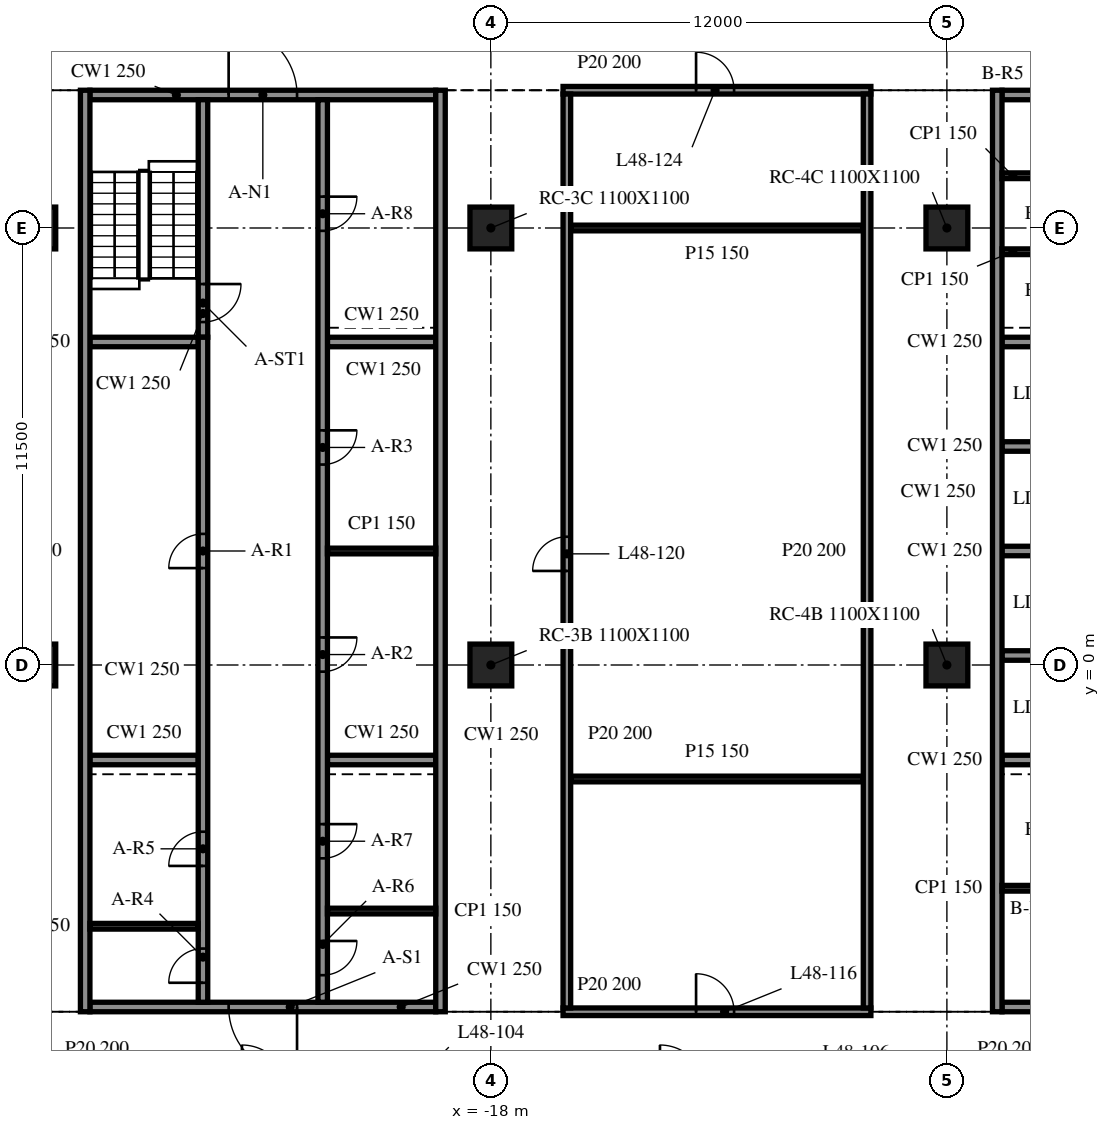
"""IFC4 building model, lengths in metres.
Left out: names, types, materials, properties, quantities, classifications, styles, units other than length and angle.
Written with IfcOpenShell. Run it as: python <this file> out.ifc"""

import sys

from ifc_helpers import new_model, si_unit, direction, frame, frame_2d, origin, origin_2d, place, context, subcontext, project, spatial, rectangle, extrude, element, fill, save


model = new_model("IFC4")
c1 = context("Model", 3, precision=1e-05, world=origin(), true_north=direction((0.0, 1.0)))
c2 = subcontext(c1, "Body", "Model", "MODEL_VIEW")
j1 = project(units=[si_unit("LENGTHUNIT", "METRE"), si_unit("PLANEANGLEUNIT", "RADIAN")], contexts=[c1])
p1 = place(None, origin())
s1 = spatial("IfcSite", under=j1, at=p1, CompositionType="ELEMENT")
p2 = place(p1, origin())
s2 = spatial("IfcBuilding", under=s1, at=p2, CompositionType="ELEMENT")
p3 = place(p2, frame((0.0, 0.0, 201.5)))
s3 = spatial("IfcBuildingStorey", under=s2, at=p3, CompositionType="ELEMENT", Elevation=201.5)
for number, where, z_axis, x_axis in (
    (1, (-30.0, 0.0, -0.34), (0.0, 0.0, 1.0), (1.0, 0.0, 0.0)),
    (2, (-30.0, 11.5, -0.34), (0.0, 0.0, 1.0), (1.0, 0.0, 0.0)),
    (3, (-18.0, 0.0, -0.34), (0.0, 0.0, 1.0), (1.0, 0.0, 0.0)),
    (4, (-18.0, 11.5, -0.34), (0.0, 0.0, 1.0), (1.0, 0.0, 0.0)),
    (5, (-6.0, 0.0, -0.34), (0.0, 0.0, 1.0), (1.0, 0.0, 0.0)),
    (6, (-6.0, 11.5, -0.34), (0.0, 0.0, 1.0), (1.0, 0.0, 0.0)),
):
    element("IfcColumn", number, at=place(p3, frame(where, z_axis=z_axis, x_axis=x_axis)), inside=s3, PredefinedType="COLUMN", context=c2, shape_type="SweptSolid", body=[
        extrude(rectangle(XDim=1.1, YDim=1.1, at=origin_2d()), origin(), (0.0, 0.0, 1.0), 3.8),
    ])
for number, where, z_axis, x_axis in (
    (7, (-28.675, 15.125, 0.0), (0.0, 0.0, 1.0), (0.0, -1.0, 0.0)),
    (8, (-19.325, -9.125, 0.0), (0.0, 0.0, 1.0), (0.0, 1.0, 0.0)),
):
    element("IfcWall", number, at=place(p3, frame(where, z_axis=z_axis, x_axis=x_axis)), inside=s3, PredefinedType="SOLIDWALL", context=c2, shape_type="SweptSolid", body=[
        extrude(rectangle(XDim=24.25, YDim=0.25, at=frame_2d((12.125, 0.0))), origin(), (0.0, 0.0, 1.0), 3.46),
    ])
p4 = place(p3, frame((-19.45, -9.0, 0.0), z_axis=(0.0, 0.0, 1.0), x_axis=(-1.0, 0.0, 0.0)))
e9 = element("IfcWall", 9, at=p4, inside=s3, PredefinedType="SOLIDWALL", context=c2, shape_type="SweptSolid", body=[
    extrude(rectangle(XDim=9.1, YDim=0.25, at=frame_2d((4.55, 0.0))), origin(), (0.0, 0.0, 1.0), 3.46),
])
p5 = place(p4, frame((3.65, 0.0, 0.0)))
e10 = element("IfcOpeningElement", 10, at=p5, cuts=e9, PredefinedType="OPENING", context=c2, shape_type="SweptSolid", body=[
    extrude(rectangle(XDim=1.8, YDim=2.1, at=frame_2d((0.9, 1.05))), frame((0.0, 0.135, 0.0), z_axis=(0.0, -1.0, 0.0), x_axis=(1.0, 0.0, 0.0)), (0.0, 0.0, 1.0), 0.27),
])
p6 = place(p3, frame((-28.55, 15.0, 0.0), z_axis=(0.0, 0.0, 1.0), x_axis=(1.0, 0.0, 0.0)))
e11 = element("IfcWall", 11, at=p6, inside=s3, PredefinedType="SOLIDWALL", context=c2, shape_type="SweptSolid", body=[
    extrude(rectangle(XDim=9.1, YDim=0.25, at=frame_2d((4.55, 0.0))), origin(), (0.0, 0.0, 1.0), 3.46),
])
p7 = place(p6, frame((3.65, 0.0, 0.0)))
e12 = element("IfcOpeningElement", 12, at=p7, cuts=e11, PredefinedType="OPENING", context=c2, shape_type="SweptSolid", body=[
    extrude(rectangle(XDim=1.8, YDim=2.1, at=frame_2d((0.9, 1.05))), frame((0.0, 0.135, 0.0), z_axis=(0.0, -1.0, 0.0), x_axis=(1.0, 0.0, 0.0)), (0.0, 0.0, 1.0), 0.27),
])
p8 = place(p3, frame((-25.575, -8.875, 0.0), z_axis=(0.0, 0.0, 1.0), x_axis=(0.0, 1.0, 0.0)))
e13 = element("IfcWall", 13, at=p8, inside=s3, PredefinedType="SOLIDWALL", context=c2, shape_type="SweptSolid", body=[
    extrude(rectangle(XDim=17.5, YDim=0.25, at=frame_2d((8.75, 0.0))), origin(), (0.0, 0.0, 1.0), 3.46),
])
p9 = place(p8, frame((11.425, 0.0, 0.0)))
e14 = element("IfcOpeningElement", 14, at=p9, cuts=e13, PredefinedType="OPENING", context=c2, shape_type="SweptSolid", body=[
    extrude(rectangle(XDim=0.9, YDim=2.1, at=frame_2d((0.45, 1.05))), frame((0.0, 0.135, 0.0), z_axis=(0.0, -1.0, 0.0), x_axis=(1.0, 0.0, 0.0)), (0.0, 0.0, 1.0), 0.27),
])
p10 = place(p8, frame((0.512, 0.0, 0.0)))
e15 = element("IfcOpeningElement", 15, at=p10, cuts=e13, PredefinedType="OPENING", context=c2, shape_type="SweptSolid", body=[
    extrude(rectangle(XDim=0.9, YDim=2.1, at=frame_2d((0.45, 1.05))), frame((0.0, 0.135, 0.0), z_axis=(0.0, -1.0, 0.0), x_axis=(1.0, 0.0, 0.0)), (0.0, 0.0, 1.0), 0.27),
])
p11 = place(p8, frame((3.587, 0.0, 0.0)))
e16 = element("IfcOpeningElement", 16, at=p11, cuts=e13, PredefinedType="OPENING", context=c2, shape_type="SweptSolid", body=[
    extrude(rectangle(XDim=0.9, YDim=2.1, at=frame_2d((0.45, 1.05))), frame((0.0, 0.135, 0.0), z_axis=(0.0, -1.0, 0.0), x_axis=(1.0, 0.0, 0.0)), (0.0, 0.0, 1.0), 0.27),
])
p12 = place(p3, frame((-25.575, 14.875, 0.0), z_axis=(0.0, 0.0, 1.0), x_axis=(0.0, -1.0, 0.0)))
e17 = element("IfcWall", 17, at=p12, inside=s3, PredefinedType="SOLIDWALL", context=c2, shape_type="SweptSolid", body=[
    extrude(rectangle(XDim=6.25, YDim=0.25, at=frame_2d((3.125, 0.0))), origin(), (0.0, 0.0, 1.0), 3.46),
])
p13 = place(p12, frame((4.85, 0.0, 0.0)))
e18 = element("IfcOpeningElement", 18, at=p13, cuts=e17, PredefinedType="OPENING", context=c2, shape_type="SweptSolid", body=[
    extrude(rectangle(XDim=1.0, YDim=2.1, at=frame_2d((0.5, 1.05))), frame((0.0, 0.135, 0.0), z_axis=(0.0, -1.0, 0.0), x_axis=(1.0, 0.0, 0.0)), (0.0, 0.0, 1.0), 0.27),
])
p14 = place(p3, frame((-22.425, 14.875, 0.0), z_axis=(0.0, 0.0, 1.0), x_axis=(0.0, -1.0, 0.0)))
e19 = element("IfcWall", 19, at=p14, inside=s3, PredefinedType="SOLIDWALL", context=c2, shape_type="SweptSolid", body=[
    extrude(rectangle(XDim=23.75, YDim=0.25, at=frame_2d((11.875, 0.0))), origin(), (0.0, 0.0, 1.0), 3.46),
])
p15 = place(p14, frame((14.15, 0.0, 0.0)))
e20 = element("IfcOpeningElement", 20, at=p15, cuts=e19, PredefinedType="OPENING", context=c2, shape_type="SweptSolid", body=[
    extrude(rectangle(XDim=0.9, YDim=2.1, at=frame_2d((0.45, 1.05))), frame((0.0, 0.135, 0.0), z_axis=(0.0, -1.0, 0.0), x_axis=(1.0, 0.0, 0.0)), (0.0, 0.0, 1.0), 0.27),
])
p16 = place(p14, frame((8.7, 0.0, 0.0)))
e21 = element("IfcOpeningElement", 21, at=p16, cuts=e19, PredefinedType="OPENING", context=c2, shape_type="SweptSolid", body=[
    extrude(rectangle(XDim=0.9, YDim=2.1, at=frame_2d((0.45, 1.05))), frame((0.0, 0.135, 0.0), z_axis=(0.0, -1.0, 0.0), x_axis=(1.0, 0.0, 0.0)), (0.0, 0.0, 1.0), 0.27),
])
p17 = place(p14, frame((22.137, 0.0, 0.0)))
e22 = element("IfcOpeningElement", 22, at=p17, cuts=e19, PredefinedType="OPENING", context=c2, shape_type="SweptSolid", body=[
    extrude(rectangle(XDim=0.9, YDim=2.1, at=frame_2d((0.45, 1.05))), frame((0.0, 0.135, 0.0), z_axis=(0.0, -1.0, 0.0), x_axis=(1.0, 0.0, 0.0)), (0.0, 0.0, 1.0), 0.27),
])
p18 = place(p14, frame((19.062, 0.0, 0.0)))
e23 = element("IfcOpeningElement", 23, at=p18, cuts=e19, PredefinedType="OPENING", context=c2, shape_type="SweptSolid", body=[
    extrude(rectangle(XDim=0.9, YDim=2.1, at=frame_2d((0.45, 1.05))), frame((0.0, 0.135, 0.0), z_axis=(0.0, -1.0, 0.0), x_axis=(1.0, 0.0, 0.0)), (0.0, 0.0, 1.0), 0.27),
])
p19 = place(p14, frame((2.55, 0.0, 0.0)))
e24 = element("IfcOpeningElement", 24, at=p19, cuts=e19, PredefinedType="OPENING", context=c2, shape_type="SweptSolid", body=[
    extrude(rectangle(XDim=0.9, YDim=2.1, at=frame_2d((0.45, 1.05))), frame((0.0, 0.135, 0.0), z_axis=(0.0, -1.0, 0.0), x_axis=(1.0, 0.0, 0.0)), (0.0, 0.0, 1.0), 0.27),
])
for number, where, z_axis, x_axis in (
    (25, (-28.55, -2.5, 0.0), (0.0, 0.0, 1.0), (1.0, 0.0, 0.0)),
    (26, (-28.55, 8.5, 0.0), (0.0, 0.0, 1.0), (1.0, 0.0, 0.0)),
    (27, (-22.3, -2.5, 0.0), (0.0, 0.0, 1.0), (1.0, 0.0, 0.0)),
    (28, (-22.3, 8.5, 0.0), (0.0, 0.0, 1.0), (1.0, 0.0, 0.0)),
):
    element("IfcWall", number, at=place(p3, frame(where, z_axis=z_axis, x_axis=x_axis)), inside=s3, PredefinedType="SOLIDWALL", context=c2, shape_type="SweptSolid", body=[
        extrude(rectangle(XDim=2.85, YDim=0.25, at=frame_2d((1.425, 0.0))), origin(), (0.0, 0.0, 1.0), 3.46),
    ])
for number, where, z_axis, x_axis in (
    (29, (-22.3, 3.0, 0.0), (0.0, 0.0, 1.0), (1.0, 0.0, 0.0)),
    (30, (-28.55, -6.875, 0.0), (0.0, 0.0, 1.0), (1.0, 0.0, 0.0)),
    (31, (-22.3, -6.475, 0.0), (0.0, 0.0, 1.0), (1.0, 0.0, 0.0)),
):
    element("IfcWall", number, at=place(p3, frame(where, z_axis=z_axis, x_axis=x_axis)), inside=s3, PredefinedType="PARTITIONING", context=c2, shape_type="SweptSolid", body=[
        extrude(rectangle(XDim=2.85, YDim=0.15, at=frame_2d((1.425, 0.0))), origin(), (0.0, 0.0, 1.0), 3.46),
    ])
p20 = place(p3, frame((-4.675, 15.125, 0.0), z_axis=(0.0, 0.0, 1.0), x_axis=(0.0, -1.0, 0.0)))
e32 = element("IfcWall", 32, at=p20, inside=s3, PredefinedType="SOLIDWALL", context=c2, shape_type="SweptSolid", body=[
    extrude(rectangle(XDim=24.25, YDim=0.25, at=frame_2d((12.125, 0.0))), origin(), (0.0, 0.0, 1.0), 3.46),
])
p21 = place(p3, frame((4.55, -9.0, 0.0), z_axis=(0.0, 0.0, 1.0), x_axis=(-1.0, 0.0, 0.0)))
e33 = element("IfcWall", 33, at=p21, inside=s3, PredefinedType="SOLIDWALL", context=c2, shape_type="SweptSolid", body=[
    extrude(rectangle(XDim=9.1, YDim=0.25, at=frame_2d((4.55, 0.0))), origin(), (0.0, 0.0, 1.0), 3.46),
])
p22 = place(p21, frame((3.65, 0.0, 0.0)))
e34 = element("IfcOpeningElement", 34, at=p22, cuts=e33, PredefinedType="OPENING", context=c2, shape_type="SweptSolid", body=[
    extrude(rectangle(XDim=1.8, YDim=2.1, at=frame_2d((0.9, 1.05))), frame((0.0, 0.135, 0.0), z_axis=(0.0, -1.0, 0.0), x_axis=(1.0, 0.0, 0.0)), (0.0, 0.0, 1.0), 0.27),
])
p23 = place(p3, frame((-4.55, 15.0, 0.0), z_axis=(0.0, 0.0, 1.0), x_axis=(1.0, 0.0, 0.0)))
e35 = element("IfcWall", 35, at=p23, inside=s3, PredefinedType="SOLIDWALL", context=c2, shape_type="SweptSolid", body=[
    extrude(rectangle(XDim=9.1, YDim=0.25, at=frame_2d((4.55, 0.0))), origin(), (0.0, 0.0, 1.0), 3.46),
])
p24 = place(p23, frame((3.65, 0.0, 0.0)))
e36 = element("IfcOpeningElement", 36, at=p24, cuts=e35, PredefinedType="OPENING", context=c2, shape_type="SweptSolid", body=[
    extrude(rectangle(XDim=1.8, YDim=2.1, at=frame_2d((0.9, 1.05))), frame((0.0, 0.135, 0.0), z_axis=(0.0, -1.0, 0.0), x_axis=(1.0, 0.0, 0.0)), (0.0, 0.0, 1.0), 0.27),
])
for number, where, z_axis, x_axis in (
    (37, (-4.55, -2.5, 0.0), (0.0, 0.0, 1.0), (1.0, 0.0, 0.0)),
    (38, (-4.55, 0.25, 0.0), (0.0, 0.0, 1.0), (1.0, 0.0, 0.0)),
    (39, (-4.55, 3.0, 0.0), (0.0, 0.0, 1.0), (1.0, 0.0, 0.0)),
    (40, (-4.55, 5.75, 0.0), (0.0, 0.0, 1.0), (1.0, 0.0, 0.0)),
    (41, (-4.55, 8.5, 0.0), (0.0, 0.0, 1.0), (1.0, 0.0, 0.0)),
):
    element("IfcWall", number, at=place(p3, frame(where, z_axis=z_axis, x_axis=x_axis)), inside=s3, PredefinedType="SOLIDWALL", context=c2, shape_type="SweptSolid", body=[
        extrude(rectangle(XDim=2.85, YDim=0.25, at=frame_2d((1.425, 0.0))), origin(), (0.0, 0.0, 1.0), 3.46),
    ])
for number, where, z_axis, x_axis in (
    (42, (-4.55, -5.875, 0.0), (0.0, 0.0, 1.0), (1.0, 0.0, 0.0)),
    (43, (-4.55, 10.875, 0.0), (0.0, 0.0, 1.0), (1.0, 0.0, 0.0)),
    (44, (-4.55, 12.875, 0.0), (0.0, 0.0, 1.0), (1.0, 0.0, 0.0)),
):
    element("IfcWall", number, at=place(p3, frame(where, z_axis=z_axis, x_axis=x_axis)), inside=s3, PredefinedType="PARTITIONING", context=c2, shape_type="SweptSolid", body=[
        extrude(rectangle(XDim=2.85, YDim=0.15, at=frame_2d((1.425, 0.0))), origin(), (0.0, 0.0, 1.0), 3.46),
    ])
p25 = place(p3, frame((-16.1, -9.125, 0.0), z_axis=(0.0, 0.0, 1.0), x_axis=(1.0, 0.0, 0.0)))
e45 = element("IfcWall", 45, at=p25, inside=s3, PredefinedType="PARTITIONING", context=c2, shape_type="SweptSolid", body=[
    extrude(rectangle(XDim=8.1, YDim=0.2, at=frame_2d((4.05, 0.0))), origin(), (0.0, 0.0, 1.0), 3.46),
])
p26 = place(p25, frame((3.5, 0.0, 0.0)))
e46 = element("IfcOpeningElement", 46, at=p26, cuts=e45, PredefinedType="OPENING", context=c2, shape_type="SweptSolid", body=[
    extrude(rectangle(XDim=1.0, YDim=2.1, at=frame_2d((0.5, 1.05))), frame((0.0, 0.11, 0.0), z_axis=(0.0, -1.0, 0.0), x_axis=(1.0, 0.0, 0.0)), (0.0, 0.0, 1.0), 0.22),
])
for number, where, z_axis, x_axis in (
    (47, (-15.9, -3.0, 0.0), (0.0, 0.0, 1.0), (1.0, 0.0, 0.0)),
    (48, (-15.9, 11.5, 0.0), (0.0, 0.0, 1.0), (1.0, 0.0, 0.0)),
):
    element("IfcWall", number, at=place(p3, frame(where, z_axis=z_axis, x_axis=x_axis)), inside=s3, PredefinedType="PARTITIONING", context=c2, shape_type="SweptSolid", body=[
        extrude(rectangle(XDim=7.7, YDim=0.15, at=frame_2d((3.85, 0.0))), origin(), (0.0, 0.0, 1.0), 3.46),
    ])
p27 = place(p3, frame((-16.1, 15.125, 0.0), z_axis=(0.0, 0.0, 1.0), x_axis=(1.0, 0.0, 0.0)))
e49 = element("IfcWall", 49, at=p27, inside=s3, PredefinedType="PARTITIONING", context=c2, shape_type="SweptSolid", body=[
    extrude(rectangle(XDim=8.1, YDim=0.2, at=frame_2d((4.05, 0.0))), origin(), (0.0, 0.0, 1.0), 3.46),
])
p28 = place(p27, frame((3.5, 0.0, 0.0)))
e50 = element("IfcOpeningElement", 50, at=p28, cuts=e49, PredefinedType="OPENING", context=c2, shape_type="SweptSolid", body=[
    extrude(rectangle(XDim=1.0, YDim=2.1, at=frame_2d((0.5, 1.05))), frame((0.0, 0.11, 0.0), z_axis=(0.0, -1.0, 0.0), x_axis=(1.0, 0.0, 0.0)), (0.0, 0.0, 1.0), 0.22),
])
p29 = place(p3, frame((-16.0, -9.025, 0.0), z_axis=(0.0, 0.0, 1.0), x_axis=(0.0, 1.0, 0.0)))
e51 = element("IfcWall", 51, at=p29, inside=s3, PredefinedType="PARTITIONING", context=c2, shape_type="SweptSolid", body=[
    extrude(rectangle(XDim=24.05, YDim=0.2, at=frame_2d((12.025, 0.0))), origin(), (0.0, 0.0, 1.0), 3.46),
])
p30 = place(p29, frame((11.5, 0.0, 0.0)))
e52 = element("IfcOpeningElement", 52, at=p30, cuts=e51, PredefinedType="OPENING", context=c2, shape_type="SweptSolid", body=[
    extrude(rectangle(XDim=0.9, YDim=2.1, at=frame_2d((0.45, 1.05))), frame((0.0, 0.11, 0.0), z_axis=(0.0, -1.0, 0.0), x_axis=(1.0, 0.0, 0.0)), (0.0, 0.0, 1.0), 0.22),
])
p31 = place(p3, frame((-8.1, -9.025, 0.0), z_axis=(0.0, 0.0, 1.0), x_axis=(0.0, 1.0, 0.0)))
e53 = element("IfcWall", 53, at=p31, inside=s3, PredefinedType="PARTITIONING", context=c2, shape_type="SweptSolid", body=[
    extrude(rectangle(XDim=24.05, YDim=0.2, at=frame_2d((12.025, 0.0))), origin(), (0.0, 0.0, 1.0), 3.46),
])
p32 = place(p5, origin())
e54 = element("IfcDoor", 54, at=p32, inside=s3, OperationType="DOUBLE_DOOR_SINGLE_SWING", PredefinedType="DOOR", context=c2, shape_type="SweptSolid", body=[
    extrude(rectangle(XDim=1.8, YDim=2.1, at=frame_2d((0.9, 1.05))), frame((0.0, 0.025, 0.0), z_axis=(0.0, -1.0, 0.0), x_axis=(1.0, 0.0, 0.0)), (0.0, 0.0, 1.0), 0.05),
])
fill(e10, e54)
p33 = place(p7, origin())
e55 = element("IfcDoor", 55, at=p33, inside=s3, OperationType="DOUBLE_DOOR_SINGLE_SWING", PredefinedType="DOOR", context=c2, shape_type="SweptSolid", body=[
    extrude(rectangle(XDim=1.8, YDim=2.1, at=frame_2d((0.9, 1.05))), frame((0.0, 0.025, 0.0), z_axis=(0.0, -1.0, 0.0), x_axis=(1.0, 0.0, 0.0)), (0.0, 0.0, 1.0), 0.05),
])
fill(e12, e55)
p34 = place(p9, origin())
e56 = element("IfcDoor", 56, at=p34, inside=s3, OperationType="SINGLE_SWING_LEFT", PredefinedType="DOOR", context=c2, shape_type="SweptSolid", body=[
    extrude(rectangle(XDim=0.9, YDim=2.1, at=frame_2d((0.45, 1.05))), frame((0.0, 0.025, 0.0), z_axis=(0.0, -1.0, 0.0), x_axis=(1.0, 0.0, 0.0)), (0.0, 0.0, 1.0), 0.05),
])
fill(e14, e56)
p35 = place(p15, origin())
e57 = element("IfcDoor", 57, at=p35, inside=s3, OperationType="SINGLE_SWING_RIGHT", PredefinedType="DOOR", context=c2, shape_type="SweptSolid", body=[
    extrude(rectangle(XDim=0.9, YDim=2.1, at=frame_2d((0.45, 1.05))), frame((0.0, 0.025, 0.0), z_axis=(0.0, -1.0, 0.0), x_axis=(1.0, 0.0, 0.0)), (0.0, 0.0, 1.0), 0.05),
])
fill(e20, e57)
p36 = place(p16, origin())
e58 = element("IfcDoor", 58, at=p36, inside=s3, OperationType="SINGLE_SWING_LEFT", PredefinedType="DOOR", context=c2, shape_type="SweptSolid", body=[
    extrude(rectangle(XDim=0.9, YDim=2.1, at=frame_2d((0.45, 1.05))), frame((0.0, 0.025, 0.0), z_axis=(0.0, -1.0, 0.0), x_axis=(1.0, 0.0, 0.0)), (0.0, 0.0, 1.0), 0.05),
])
fill(e21, e58)
p37 = place(p10, origin())
e59 = element("IfcDoor", 59, at=p37, inside=s3, OperationType="SINGLE_SWING_RIGHT", PredefinedType="DOOR", context=c2, shape_type="SweptSolid", body=[
    extrude(rectangle(XDim=0.9, YDim=2.1, at=frame_2d((0.45, 1.05))), frame((0.0, 0.025, 0.0), z_axis=(0.0, -1.0, 0.0), x_axis=(1.0, 0.0, 0.0)), (0.0, 0.0, 1.0), 0.05),
])
fill(e15, e59)
p38 = place(p11, origin())
e60 = element("IfcDoor", 60, at=p38, inside=s3, OperationType="SINGLE_SWING_LEFT", PredefinedType="DOOR", context=c2, shape_type="SweptSolid", body=[
    extrude(rectangle(XDim=0.9, YDim=2.1, at=frame_2d((0.45, 1.05))), frame((0.0, 0.025, 0.0), z_axis=(0.0, -1.0, 0.0), x_axis=(1.0, 0.0, 0.0)), (0.0, 0.0, 1.0), 0.05),
])
fill(e16, e60)
p39 = place(p17, origin())
e61 = element("IfcDoor", 61, at=p39, inside=s3, OperationType="SINGLE_SWING_RIGHT", PredefinedType="DOOR", context=c2, shape_type="SweptSolid", body=[
    extrude(rectangle(XDim=0.9, YDim=2.1, at=frame_2d((0.45, 1.05))), frame((0.0, 0.025, 0.0), z_axis=(0.0, -1.0, 0.0), x_axis=(1.0, 0.0, 0.0)), (0.0, 0.0, 1.0), 0.05),
])
fill(e22, e61)
p40 = place(p18, origin())
e62 = element("IfcDoor", 62, at=p40, inside=s3, OperationType="SINGLE_SWING_LEFT", PredefinedType="DOOR", context=c2, shape_type="SweptSolid", body=[
    extrude(rectangle(XDim=0.9, YDim=2.1, at=frame_2d((0.45, 1.05))), frame((0.0, 0.025, 0.0), z_axis=(0.0, -1.0, 0.0), x_axis=(1.0, 0.0, 0.0)), (0.0, 0.0, 1.0), 0.05),
])
fill(e23, e62)
p41 = place(p19, origin())
e63 = element("IfcDoor", 63, at=p41, inside=s3, OperationType="SINGLE_SWING_RIGHT", PredefinedType="DOOR", context=c2, shape_type="SweptSolid", body=[
    extrude(rectangle(XDim=0.9, YDim=2.1, at=frame_2d((0.45, 1.05))), frame((0.0, 0.025, 0.0), z_axis=(0.0, -1.0, 0.0), x_axis=(1.0, 0.0, 0.0)), (0.0, 0.0, 1.0), 0.05),
])
fill(e24, e63)
p42 = place(p13, origin())
e64 = element("IfcDoor", 64, at=p42, inside=s3, OperationType="SINGLE_SWING_LEFT", PredefinedType="DOOR", context=c2, shape_type="SweptSolid", body=[
    extrude(rectangle(XDim=1.0, YDim=2.1, at=frame_2d((0.5, 1.05))), frame((0.0, 0.025, 0.0), z_axis=(0.0, -1.0, 0.0), x_axis=(1.0, 0.0, 0.0)), (0.0, 0.0, 1.0), 0.05),
])
fill(e18, e64)
p43 = place(p26, origin())
e65 = element("IfcDoor", 65, at=p43, inside=s3, OperationType="SINGLE_SWING_LEFT", PredefinedType="DOOR", context=c2, shape_type="SweptSolid", body=[
    extrude(rectangle(XDim=1.0, YDim=2.1, at=frame_2d((0.5, 1.05))), frame((0.0, 0.025, 0.0), z_axis=(0.0, -1.0, 0.0), x_axis=(1.0, 0.0, 0.0)), (0.0, 0.0, 1.0), 0.05),
])
fill(e46, e65)
p44 = place(p30, origin())
e66 = element("IfcDoor", 66, at=p44, inside=s3, OperationType="SINGLE_SWING_RIGHT", PredefinedType="DOOR", context=c2, shape_type="SweptSolid", body=[
    extrude(rectangle(XDim=0.9, YDim=2.1, at=frame_2d((0.45, 1.05))), frame((0.0, 0.025, 0.0), z_axis=(0.0, -1.0, 0.0), x_axis=(1.0, 0.0, 0.0)), (0.0, 0.0, 1.0), 0.05),
])
fill(e52, e66)
p45 = place(p28, origin())
e67 = element("IfcDoor", 67, at=p45, inside=s3, OperationType="SINGLE_SWING_RIGHT", PredefinedType="DOOR", context=c2, shape_type="SweptSolid", body=[
    extrude(rectangle(XDim=1.0, YDim=2.1, at=frame_2d((0.5, 1.05))), frame((0.0, 0.025, 0.0), z_axis=(0.0, -1.0, 0.0), x_axis=(1.0, 0.0, 0.0)), (0.0, 0.0, 1.0), 0.05),
])
fill(e50, e67)
save(model, sys.argv[1])
